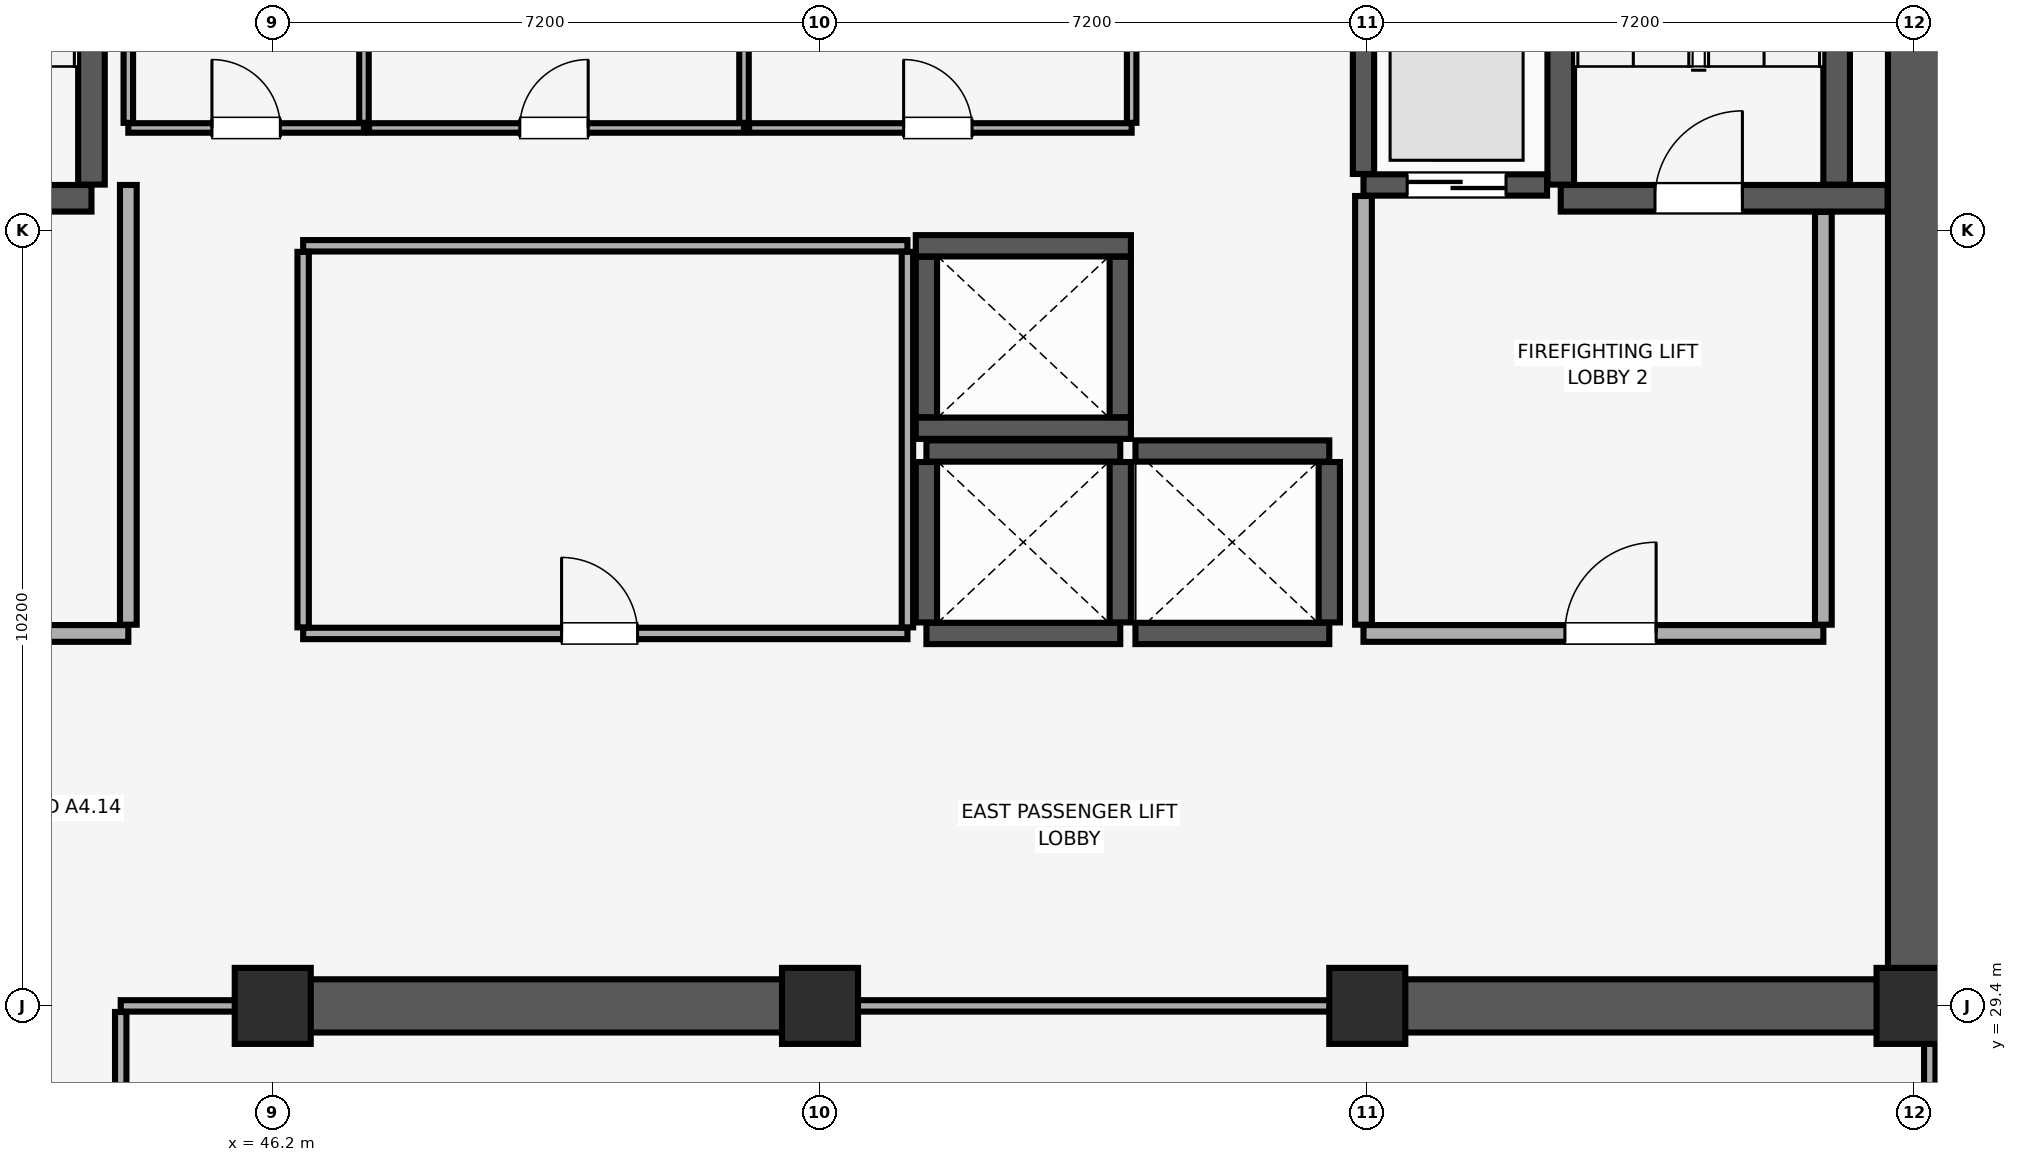
"""IFC4 building model, lengths in metres.
Left out: names, types, materials, properties, quantities, classifications, styles, units other than length and angle.
Written with IfcOpenShell. Run it as: python <this file> out.ifc"""

import sys

from ifc_helpers import new_model, si_unit, direction, frame, frame_2d, origin, origin_2d, place, context, subcontext, project, spatial, rectangle, extrude, element, fill, save


model = new_model("IFC4")
c1 = context("Model", 3, precision=1e-05, world=origin(), true_north=direction((0.0, 1.0)))
c2 = subcontext(c1, "Body", "Model", "MODEL_VIEW")
j1 = project(units=[si_unit("LENGTHUNIT", "METRE"), si_unit("PLANEANGLEUNIT", "RADIAN")], contexts=[c1])
p1 = place(None, origin())
s1 = spatial("IfcSite", under=j1, at=p1, CompositionType="ELEMENT")
p2 = place(p1, origin())
s2 = spatial("IfcBuilding", under=s1, at=p2, CompositionType="ELEMENT")
p3 = place(p2, frame((0.0, 0.0, 300.2)))
s3 = spatial("IfcBuildingStorey", under=s2, at=p3, CompositionType="ELEMENT", Elevation=300.2)
for number, where, z_axis, x_axis in (
    (1, (46.2, 29.4, 0.0), (0.0, 0.0, 1.0), (1.0, 0.0, 0.0)),
    (2, (53.4, 29.4, 0.0), (0.0, 0.0, 1.0), (1.0, 0.0, 0.0)),
    (3, (60.6, 29.4, 0.0), (0.0, 0.0, 1.0), (1.0, 0.0, 0.0)),
    (4, (67.8, 29.4, 0.0), (0.0, 0.0, 1.0), (1.0, 0.0, 0.0)),
):
    element("IfcColumn", number, at=place(p3, frame(where, z_axis=z_axis, x_axis=x_axis)), inside=s3, PredefinedType="COLUMN", context=c2, shape_type="SweptSolid", body=[
        extrude(rectangle(XDim=1.0, YDim=1.0, at=origin_2d()), origin(), (0.0, 0.0, 1.0), 5.12),
    ])
p4 = place(p3, frame((67.8, 29.4, 0.0), z_axis=(0.0, 0.0, 1.0), x_axis=(0.0, 1.0, 0.0)))
e5 = element("IfcWall", 5, at=p4, inside=s3, PredefinedType="SHEAR", context=c2, shape_type="SweptSolid", body=[
    extrude(rectangle(XDim=19.2, YDim=0.7, at=frame_2d((9.6, 0.0))), origin(), (0.0, 0.0, 1.0), 5.12),
])
p5 = place(p3, frame((46.0, 29.4, 0.0), z_axis=(0.0, 0.0, 1.0), x_axis=(1.0, 0.0, 0.0)))
e6 = element("IfcWall", 6, at=p5, inside=s3, PredefinedType="SHEAR", context=c2, shape_type="SweptSolid", body=[
    extrude(rectangle(XDim=7.6, YDim=0.7, at=frame_2d((3.8, 0.0))), origin(), (0.0, 0.0, 1.0), 5.12),
])
p6 = place(p3, frame((60.4, 29.4, 0.0), z_axis=(0.0, 0.0, 1.0), x_axis=(1.0, 0.0, 0.0)))
e7 = element("IfcWall", 7, at=p6, inside=s3, PredefinedType="SHEAR", context=c2, shape_type="SweptSolid", body=[
    extrude(rectangle(XDim=7.045, YDim=0.7, at=frame_2d((3.522, 0.0))), origin(), (0.0, 0.0, 1.0), 5.12),
])
p7 = place(p3, frame((40.185, 40.025, 0.0), z_axis=(0.0, 0.0, 1.0), x_axis=(1.0, 0.0, 0.0)))
e8 = element("IfcWall", 8, at=p7, inside=s3, PredefinedType="SHEAR", context=c2, shape_type="SweptSolid", body=[
    extrude(rectangle(XDim=3.63, YDim=0.35, at=frame_2d((1.815, 0.0))), origin(), (0.0, 0.0, 1.0), 5.12),
])
p8 = place(p7, frame((1.24, 0.0, 0.0)))
e9 = element("IfcOpeningElement", 9, at=p8, cuts=e8, PredefinedType="OPENING", context=c2, shape_type="SweptSolid", body=[
    extrude(rectangle(XDim=1.15, YDim=2.15, at=frame_2d((0.575, 1.075))), frame((0.0, 0.185, 0.0), z_axis=(0.0, -1.0, 0.0), x_axis=(1.0, 0.0, 0.0)), (0.0, 0.0, 1.0), 0.37),
])
p9 = place(p3, frame((43.815, 40.205, 0.0), z_axis=(0.0, 0.0, 1.0), x_axis=(0.0, 1.0, 0.0)))
e10 = element("IfcWall", 10, at=p9, inside=s3, PredefinedType="SHEAR", context=c2, shape_type="SweptSolid", body=[
    extrude(rectangle(XDim=8.09, YDim=0.35, at=frame_2d((4.045, 0.0))), origin(), (0.0, 0.0, 1.0), 5.12),
])
p10 = place(p3, frame((63.145, 40.025, 0.0), z_axis=(0.0, 0.0, 1.0), x_axis=(1.0, 0.0, 0.0)))
e11 = element("IfcWall", 11, at=p10, inside=s3, PredefinedType="SHEAR", context=c2, shape_type="SweptSolid", body=[
    extrude(rectangle(XDim=4.3, YDim=0.35, at=frame_2d((2.15, 0.0))), origin(), (0.0, 0.0, 1.0), 5.12),
])
p11 = place(p10, frame((1.24, 0.0, 0.0)))
e12 = element("IfcOpeningElement", 12, at=p11, cuts=e11, PredefinedType="OPENING", context=c2, shape_type="SweptSolid", body=[
    extrude(rectangle(XDim=1.15, YDim=2.15, at=frame_2d((0.575, 1.075))), frame((0.0, 0.185, 0.0), z_axis=(0.0, -1.0, 0.0), x_axis=(1.0, 0.0, 0.0)), (0.0, 0.0, 1.0), 0.37),
])
for number, where, z_axis, x_axis in (
    (13, (63.145, 40.205, 0.0), (0.0, 0.0, 1.0), (0.0, 1.0, 0.0)),
    (14, (66.775, 40.205, 0.0), (0.0, 0.0, 1.0), (0.0, 1.0, 0.0)),
):
    element("IfcWall", number, at=place(p3, frame(where, z_axis=z_axis, x_axis=x_axis)), inside=s3, PredefinedType="SHEAR", context=c2, shape_type="SweptSolid", body=[
        extrude(rectangle(XDim=8.09, YDim=0.35, at=frame_2d((4.045, 0.0))), origin(), (0.0, 0.0, 1.0), 5.12),
    ])
for number, where, z_axis, x_axis in (
    (15, (54.8, 34.3, 0.0), (0.0, 0.0, 1.0), (1.0, 0.0, 0.0)),
    (16, (54.8, 36.7, 0.0), (0.0, 0.0, 1.0), (1.0, 0.0, 0.0)),
):
    element("IfcWall", number, at=place(p3, frame(where, z_axis=z_axis, x_axis=x_axis)), inside=s3, PredefinedType="SHEAR", context=c2, shape_type="SweptSolid", body=[
        extrude(rectangle(XDim=2.55, YDim=0.28, at=frame_2d((1.275, 0.0))), origin(), (0.0, 0.0, 1.0), 5.12),
    ])
for number, where, z_axis, x_axis in (
    (17, (54.8, 34.445, 0.0), (0.0, 0.0, 1.0), (0.0, 1.0, 0.0)),
    (18, (57.35, 34.445, 0.0), (0.0, 0.0, 1.0), (0.0, 1.0, 0.0)),
):
    element("IfcWall", number, at=place(p3, frame(where, z_axis=z_axis, x_axis=x_axis)), inside=s3, PredefinedType="SHEAR", context=c2, shape_type="SweptSolid", body=[
        extrude(rectangle(XDim=2.11, YDim=0.28, at=frame_2d((1.055, 0.0))), origin(), (0.0, 0.0, 1.0), 5.12),
    ])
for number, where, z_axis, x_axis in (
    (19, (57.55, 34.3, 0.0), (0.0, 0.0, 1.0), (1.0, 0.0, 0.0)),
    (20, (57.55, 36.7, 0.0), (0.0, 0.0, 1.0), (1.0, 0.0, 0.0)),
):
    element("IfcWall", number, at=place(p3, frame(where, z_axis=z_axis, x_axis=x_axis)), inside=s3, PredefinedType="SHEAR", context=c2, shape_type="SweptSolid", body=[
        extrude(rectangle(XDim=2.55, YDim=0.28, at=frame_2d((1.275, 0.0))), origin(), (0.0, 0.0, 1.0), 5.12),
    ])
p12 = place(p3, frame((60.1, 34.445, 0.0), z_axis=(0.0, 0.0, 1.0), x_axis=(0.0, 1.0, 0.0)))
e21 = element("IfcWall", 21, at=p12, inside=s3, PredefinedType="SHEAR", context=c2, shape_type="SweptSolid", body=[
    extrude(rectangle(XDim=2.11, YDim=0.28, at=frame_2d((1.055, 0.0))), origin(), (0.0, 0.0, 1.0), 5.12),
])
for number, where, z_axis, x_axis in (
    (22, (54.66, 37.0, 0.0), (0.0, 0.0, 1.0), (1.0, 0.0, 0.0)),
    (23, (54.66, 39.4, 0.0), (0.0, 0.0, 1.0), (1.0, 0.0, 0.0)),
):
    element("IfcWall", number, at=place(p3, frame(where, z_axis=z_axis, x_axis=x_axis)), inside=s3, PredefinedType="SHEAR", context=c2, shape_type="SweptSolid", body=[
        extrude(rectangle(XDim=2.83, YDim=0.28, at=frame_2d((1.415, 0.0))), origin(), (0.0, 0.0, 1.0), 5.12),
    ])
for number, where, z_axis, x_axis in (
    (24, (54.8, 37.145, 0.0), (0.0, 0.0, 1.0), (0.0, 1.0, 0.0)),
    (25, (57.35, 37.145, 0.0), (0.0, 0.0, 1.0), (0.0, 1.0, 0.0)),
):
    element("IfcWall", number, at=place(p3, frame(where, z_axis=z_axis, x_axis=x_axis)), inside=s3, PredefinedType="SHEAR", context=c2, shape_type="SweptSolid", body=[
        extrude(rectangle(XDim=2.11, YDim=0.28, at=frame_2d((1.055, 0.0))), origin(), (0.0, 0.0, 1.0), 5.12),
    ])
p13 = place(p3, frame((60.55, 40.2, 0.0), z_axis=(0.0, 0.0, 1.0), x_axis=(1.0, 0.0, 0.0)))
e26 = element("IfcWall", 26, at=p13, inside=s3, PredefinedType="SHEAR", context=c2, shape_type="SweptSolid", body=[
    extrude(rectangle(XDim=2.415, YDim=0.28, at=frame_2d((1.208, 0.0))), origin(), (0.0, 0.0, 1.0), 5.12),
])
p14 = place(p13, frame((0.575, 0.0, 0.0)))
e27 = element("IfcOpeningElement", 27, at=p14, cuts=e26, PredefinedType="OPENING", context=c2, shape_type="SweptSolid", body=[
    extrude(rectangle(XDim=1.3, YDim=2.3, at=frame_2d((0.65, 1.15))), frame((0.0, 0.15, 0.0), z_axis=(0.0, -1.0, 0.0), x_axis=(1.0, 0.0, 0.0)), (0.0, 0.0, 1.0), 0.3),
])
p15 = place(p3, frame((60.55, 40.345, 0.0), z_axis=(0.0, 0.0, 1.0), x_axis=(0.0, 1.0, 0.0)))
e28 = element("IfcWall", 28, at=p15, inside=s3, PredefinedType="SHEAR", context=c2, shape_type="SweptSolid", body=[
    extrude(rectangle(XDim=2.81, YDim=0.28, at=frame_2d((1.405, 0.0))), origin(), (0.0, 0.0, 1.0), 5.12),
])
p16 = place(p3, frame((60.55, 34.3, 0.0), z_axis=(0.0, 0.0, 1.0), x_axis=(1.0, 0.0, 0.0)))
e29 = element("IfcWall", 29, at=p16, inside=s3, PredefinedType="PARTITIONING", context=c2, shape_type="SweptSolid", body=[
    extrude(rectangle(XDim=6.05, YDim=0.22, at=frame_2d((3.025, 0.0))), origin(), (0.0, 0.0, 1.0), 5.12),
])
p17 = place(p16, frame((2.65, 0.0, 0.0)))
e30 = element("IfcOpeningElement", 30, at=p17, cuts=e29, PredefinedType="OPENING", context=c2, shape_type="SweptSolid", body=[
    extrude(rectangle(XDim=1.2, YDim=2.15, at=frame_2d((0.6, 1.075))), frame((0.0, 0.12, 0.0), z_axis=(0.0, -1.0, 0.0), x_axis=(1.0, 0.0, 0.0)), (0.0, 0.0, 1.0), 0.24),
])
p18 = place(p3, frame((60.55, 34.415, 0.0), z_axis=(0.0, 0.0, 1.0), x_axis=(0.0, 1.0, 0.0)))
e31 = element("IfcWall", 31, at=p18, inside=s3, PredefinedType="PARTITIONING", context=c2, shape_type="SweptSolid", body=[
    extrude(rectangle(XDim=5.64, YDim=0.22, at=frame_2d((2.82, 0.0))), origin(), (0.0, 0.0, 1.0), 5.12),
])
p19 = place(p3, frame((66.6, 34.415, 0.0), z_axis=(0.0, 0.0, 1.0), x_axis=(0.0, 1.0, 0.0)))
e32 = element("IfcWall", 32, at=p19, inside=s3, PredefinedType="PARTITIONING", context=c2, shape_type="SweptSolid", body=[
    extrude(rectangle(XDim=5.43, YDim=0.22, at=frame_2d((2.715, 0.0))), origin(), (0.0, 0.0, 1.0), 5.12),
])
p20 = place(p3, frame((39.7, 34.3, 0.0), z_axis=(0.0, 0.0, 1.0), x_axis=(1.0, 0.0, 0.0)))
e33 = element("IfcWall", 33, at=p20, inside=s3, PredefinedType="PARTITIONING", context=c2, shape_type="SweptSolid", body=[
    extrude(rectangle(XDim=4.6, YDim=0.22, at=frame_2d((2.3, 0.0))), origin(), (0.0, 0.0, 1.0), 5.12),
])
p21 = place(p20, frame((1.7, 0.0, 0.0)))
e34 = element("IfcOpeningElement", 34, at=p21, cuts=e33, PredefinedType="OPENING", context=c2, shape_type="SweptSolid", body=[
    extrude(rectangle(XDim=1.2, YDim=2.15, at=frame_2d((0.6, 1.075))), frame((0.0, 0.12, 0.0), z_axis=(0.0, -1.0, 0.0), x_axis=(1.0, 0.0, 0.0)), (0.0, 0.0, 1.0), 0.24),
])
p22 = place(p3, frame((44.3, 34.415, 0.0), z_axis=(0.0, 0.0, 1.0), x_axis=(0.0, 1.0, 0.0)))
e35 = element("IfcWall", 35, at=p22, inside=s3, PredefinedType="PARTITIONING", context=c2, shape_type="SweptSolid", body=[
    extrude(rectangle(XDim=5.785, YDim=0.22, at=frame_2d((2.893, 0.0))), origin(), (0.0, 0.0, 1.0), 5.12),
])
p23 = place(p3, frame((46.6, 34.3, 0.0), z_axis=(0.0, 0.0, 1.0), x_axis=(1.0, 0.0, 0.0)))
e36 = element("IfcWall", 36, at=p23, inside=s3, PredefinedType="PARTITIONING", context=c2, shape_type="SweptSolid", body=[
    extrude(rectangle(XDim=7.95, YDim=0.15, at=frame_2d((3.975, 0.0))), origin(), (0.0, 0.0, 1.0), 5.12),
])
p24 = place(p23, frame((3.4, 0.0, 0.0)))
e37 = element("IfcOpeningElement", 37, at=p24, cuts=e36, PredefinedType="OPENING", context=c2, shape_type="SweptSolid", body=[
    extrude(rectangle(XDim=1.0, YDim=2.15, at=frame_2d((0.5, 1.075))), frame((0.0, 0.085, 0.0), z_axis=(0.0, -1.0, 0.0), x_axis=(1.0, 0.0, 0.0)), (0.0, 0.0, 1.0), 0.17),
])
p25 = place(p3, frame((46.6, 39.4, 0.0), z_axis=(0.0, 0.0, 1.0), x_axis=(1.0, 0.0, 0.0)))
e38 = element("IfcWall", 38, at=p25, inside=s3, PredefinedType="PARTITIONING", context=c2, shape_type="SweptSolid", body=[
    extrude(rectangle(XDim=7.95, YDim=0.15, at=frame_2d((3.975, 0.0))), origin(), (0.0, 0.0, 1.0), 5.12),
])
for number, where, z_axis, x_axis in (
    (39, (46.6, 34.38, 0.0), (0.0, 0.0, 1.0), (0.0, 1.0, 0.0)),
    (40, (54.55, 34.38, 0.0), (0.0, 0.0, 1.0), (0.0, 1.0, 0.0)),
):
    element("IfcWall", number, at=place(p3, frame(where, z_axis=z_axis, x_axis=x_axis)), inside=s3, PredefinedType="PARTITIONING", context=c2, shape_type="SweptSolid", body=[
        extrude(rectangle(XDim=4.94, YDim=0.15, at=frame_2d((2.47, 0.0))), origin(), (0.0, 0.0, 1.0), 5.12),
    ])
p26 = place(p3, frame((44.3, 40.95, 0.0), z_axis=(0.0, 0.0, 1.0), x_axis=(1.0, 0.0, 0.0)))
e41 = element("IfcWall", 41, at=p26, inside=s3, PredefinedType="PARTITIONING", context=c2, shape_type="SweptSolid", body=[
    extrude(rectangle(XDim=3.1, YDim=0.125, at=frame_2d((1.55, 0.0))), origin(), (0.0, 0.0, 1.0), 5.12),
])
p27 = place(p26, frame((1.1, 0.0, 0.0)))
e42 = element("IfcOpeningElement", 42, at=p27, cuts=e41, PredefinedType="OPENING", context=c2, shape_type="SweptSolid", body=[
    extrude(rectangle(XDim=0.9, YDim=2.1, at=frame_2d((0.45, 1.05))), frame((0.0, 0.073, 0.0), z_axis=(0.0, -1.0, 0.0), x_axis=(1.0, 0.0, 0.0)), (0.0, 0.0, 1.0), 0.145),
])
for number, where, z_axis, x_axis in (
    (43, (44.3, 41.018, 0.0), (0.0, 0.0, 1.0), (0.0, 1.0, 0.0)),
    (44, (47.4, 41.018, 0.0), (0.0, 0.0, 1.0), (0.0, 1.0, 0.0)),
):
    element("IfcWall", number, at=place(p3, frame(where, z_axis=z_axis, x_axis=x_axis)), inside=s3, PredefinedType="PARTITIONING", context=c2, shape_type="SweptSolid", body=[
        extrude(rectangle(XDim=7.833, YDim=0.125, at=frame_2d((3.916, 0.0))), origin(), (0.0, 0.0, 1.0), 5.12),
    ])
p28 = place(p3, frame((47.468, 40.95, 0.0), z_axis=(0.0, 0.0, 1.0), x_axis=(1.0, 0.0, 0.0)))
e45 = element("IfcWall", 45, at=p28, inside=s3, PredefinedType="PARTITIONING", context=c2, shape_type="SweptSolid", body=[
    extrude(rectangle(XDim=4.932, YDim=0.125, at=frame_2d((2.466, 0.0))), origin(), (0.0, 0.0, 1.0), 5.12),
])
p29 = place(p28, frame((1.982, 0.0, 0.0)))
e46 = element("IfcOpeningElement", 46, at=p29, cuts=e45, PredefinedType="OPENING", context=c2, shape_type="SweptSolid", body=[
    extrude(rectangle(XDim=0.9, YDim=2.1, at=frame_2d((0.45, 1.05))), frame((0.0, 0.073, 0.0), z_axis=(0.0, -1.0, 0.0), x_axis=(1.0, 0.0, 0.0)), (0.0, 0.0, 1.0), 0.145),
])
p30 = place(p3, frame((52.4, 41.018, 0.0), z_axis=(0.0, 0.0, 1.0), x_axis=(0.0, 1.0, 0.0)))
e47 = element("IfcWall", 47, at=p30, inside=s3, PredefinedType="PARTITIONING", context=c2, shape_type="SweptSolid", body=[
    extrude(rectangle(XDim=7.833, YDim=0.125, at=frame_2d((3.916, 0.0))), origin(), (0.0, 0.0, 1.0), 5.12),
])
p31 = place(p3, frame((52.468, 40.95, 0.0), z_axis=(0.0, 0.0, 1.0), x_axis=(1.0, 0.0, 0.0)))
e48 = element("IfcWall", 48, at=p31, inside=s3, PredefinedType="PARTITIONING", context=c2, shape_type="SweptSolid", body=[
    extrude(rectangle(XDim=5.032, YDim=0.125, at=frame_2d((2.516, 0.0))), origin(), (0.0, 0.0, 1.0), 5.12),
])
p32 = place(p31, frame((2.032, 0.0, 0.0)))
e49 = element("IfcOpeningElement", 49, at=p32, cuts=e48, PredefinedType="OPENING", context=c2, shape_type="SweptSolid", body=[
    extrude(rectangle(XDim=0.9, YDim=2.1, at=frame_2d((0.45, 1.05))), frame((0.0, 0.073, 0.0), z_axis=(0.0, -1.0, 0.0), x_axis=(1.0, 0.0, 0.0)), (0.0, 0.0, 1.0), 0.145),
])
p33 = place(p3, frame((57.5, 41.018, 0.0), z_axis=(0.0, 0.0, 1.0), x_axis=(0.0, 1.0, 0.0)))
e50 = element("IfcWall", 50, at=p33, inside=s3, PredefinedType="PARTITIONING", context=c2, shape_type="SweptSolid", body=[
    extrude(rectangle(XDim=2.167, YDim=0.125, at=frame_2d((1.084, 0.0))), origin(), (0.0, 0.0, 1.0), 5.12),
])
p34 = place(p3, frame((44.2, 29.4, 0.0), z_axis=(0.0, 0.0, 1.0), x_axis=(1.0, 0.0, 0.0)))
e51 = element("IfcWall", 51, at=p34, inside=s3, PredefinedType="PARTITIONING", context=c2, shape_type="SweptSolid", body=[
    extrude(rectangle(XDim=1.79, YDim=0.15, at=frame_2d((0.895, 0.0))), origin(), (0.0, 0.0, 1.0), 4.02),
])
p35 = place(p3, frame((53.61, 29.4, 0.0), z_axis=(0.0, 0.0, 1.0), x_axis=(1.0, 0.0, 0.0)))
e52 = element("IfcWall", 52, at=p35, inside=s3, PredefinedType="PARTITIONING", context=c2, shape_type="SweptSolid", body=[
    extrude(rectangle(XDim=6.78, YDim=0.15, at=frame_2d((3.39, 0.0))), origin(), (0.0, 0.0, 1.0), 4.02),
])
p36 = place(p3, frame((44.2, 23.48, 0.0), z_axis=(0.0, 0.0, 1.0), x_axis=(0.0, 1.0, 0.0)))
e53 = element("IfcWall", 53, at=p36, inside=s3, PredefinedType="PARTITIONING", context=c2, shape_type="SweptSolid", body=[
    extrude(rectangle(XDim=5.84, YDim=0.15, at=frame_2d((2.92, 0.0))), origin(), (0.0, 0.0, 1.0), 5.12),
])
p37 = place(p3, frame((68.0, 23.48, 0.0), z_axis=(0.0, 0.0, 1.0), x_axis=(0.0, 1.0, 0.0)))
e54 = element("IfcWall", 54, at=p37, inside=s3, PredefinedType="PARTITIONING", context=c2, shape_type="SweptSolid", body=[
    extrude(rectangle(XDim=5.91, YDim=0.15, at=frame_2d((2.955, 0.0))), origin(), (0.0, 0.0, 1.0), 4.76),
])
p38 = place(p11, origin())
e55 = element("IfcDoor", 55, at=p38, inside=s3, OperationType="SINGLE_SWING_RIGHT", PredefinedType="DOOR", context=c2, shape_type="SweptSolid", body=[
    extrude(rectangle(XDim=1.15, YDim=2.15, at=frame_2d((0.575, 1.075))), frame((0.0, 0.025, 0.0), z_axis=(0.0, -1.0, 0.0), x_axis=(1.0, 0.0, 0.0)), (0.0, 0.0, 1.0), 0.05),
])
fill(e12, e55)
p39 = place(p14, origin())
e56 = element("IfcDoor", 56, at=p39, inside=s3, OperationType="DOUBLE_DOOR_SLIDING", PredefinedType="DOOR", context=c2, shape_type="SweptSolid", body=[
    extrude(rectangle(XDim=1.3, YDim=2.3, at=frame_2d((0.65, 1.15))), frame((0.0, 0.025, 0.0), z_axis=(0.0, -1.0, 0.0), x_axis=(1.0, 0.0, 0.0)), (0.0, 0.0, 1.0), 0.05),
])
fill(e27, e56)
p40 = place(p17, origin())
e57 = element("IfcDoor", 57, at=p40, inside=s3, OperationType="SINGLE_SWING_RIGHT", PredefinedType="DOOR", context=c2, shape_type="SweptSolid", body=[
    extrude(rectangle(XDim=1.2, YDim=2.15, at=frame_2d((0.6, 1.075))), frame((0.0, 0.025, 0.0), z_axis=(0.0, -1.0, 0.0), x_axis=(1.0, 0.0, 0.0)), (0.0, 0.0, 1.0), 0.05),
])
fill(e30, e57)
p41 = place(p24, origin())
e58 = element("IfcDoor", 58, at=p41, inside=s3, OperationType="SINGLE_SWING_LEFT", PredefinedType="DOOR", context=c2, shape_type="SweptSolid", body=[
    extrude(rectangle(XDim=1.0, YDim=2.15, at=frame_2d((0.5, 1.075))), frame((0.0, 0.025, 0.0), z_axis=(0.0, -1.0, 0.0), x_axis=(1.0, 0.0, 0.0)), (0.0, 0.0, 1.0), 0.05),
])
fill(e37, e58)
p42 = place(p27, origin())
e59 = element("IfcDoor", 59, at=p42, inside=s3, OperationType="SINGLE_SWING_LEFT", PredefinedType="DOOR", context=c2, shape_type="SweptSolid", body=[
    extrude(rectangle(XDim=0.9, YDim=2.1, at=frame_2d((0.45, 1.05))), frame((0.0, 0.025, 0.0), z_axis=(0.0, -1.0, 0.0), x_axis=(1.0, 0.0, 0.0)), (0.0, 0.0, 1.0), 0.05),
])
fill(e42, e59)
p43 = place(p29, origin())
e60 = element("IfcDoor", 60, at=p43, inside=s3, OperationType="SINGLE_SWING_RIGHT", PredefinedType="DOOR", context=c2, shape_type="SweptSolid", body=[
    extrude(rectangle(XDim=0.9, YDim=2.1, at=frame_2d((0.45, 1.05))), frame((0.0, 0.025, 0.0), z_axis=(0.0, -1.0, 0.0), x_axis=(1.0, 0.0, 0.0)), (0.0, 0.0, 1.0), 0.05),
])
fill(e46, e60)
p44 = place(p32, origin())
e61 = element("IfcDoor", 61, at=p44, inside=s3, OperationType="SINGLE_SWING_LEFT", PredefinedType="DOOR", context=c2, shape_type="SweptSolid", body=[
    extrude(rectangle(XDim=0.9, YDim=2.1, at=frame_2d((0.45, 1.05))), frame((0.0, 0.025, 0.0), z_axis=(0.0, -1.0, 0.0), x_axis=(1.0, 0.0, 0.0)), (0.0, 0.0, 1.0), 0.05),
])
fill(e49, e61)
save(model, sys.argv[1])
